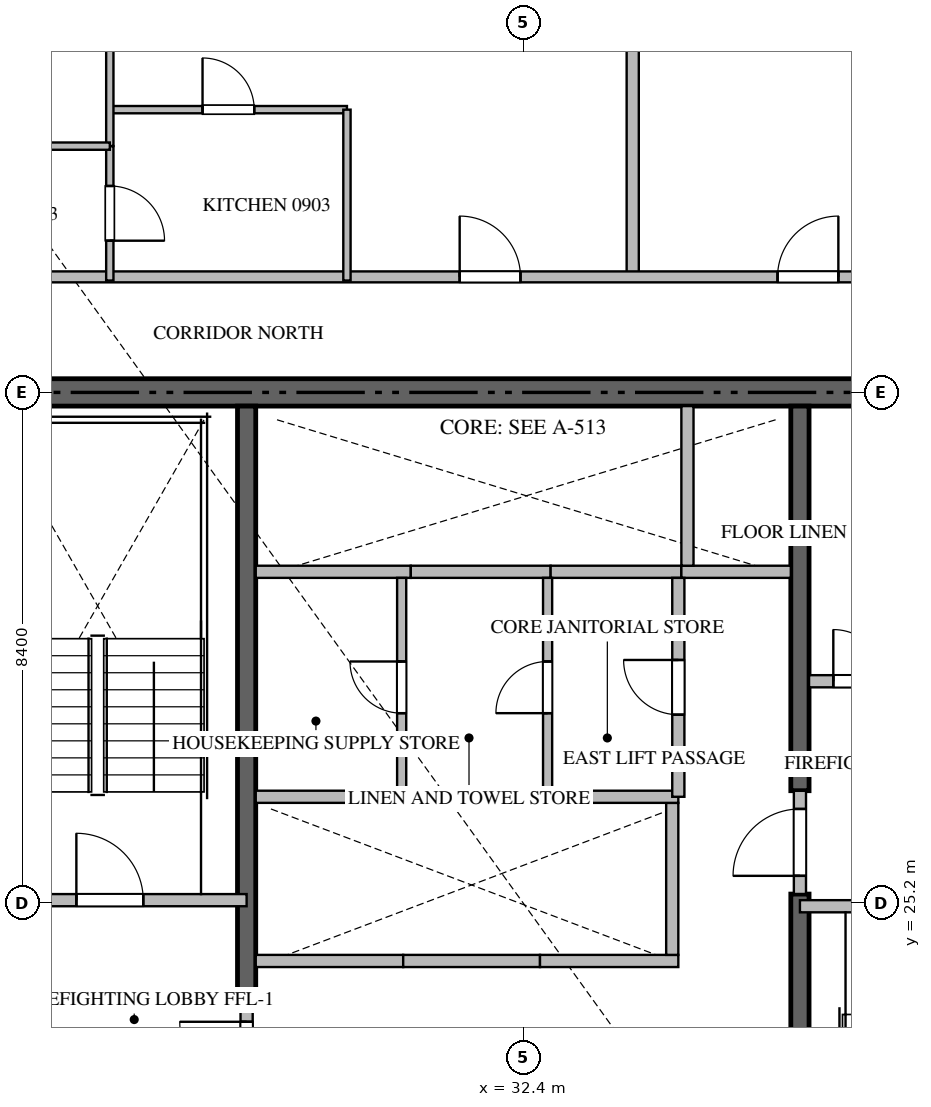
"""IFC4 building model, lengths in metres.
Left out: names, types, materials, properties, quantities, classifications, styles, units other than length and angle.
Written with IfcOpenShell. Run it as: python <this file> out.ifc"""

import sys

from ifc_helpers import new_model, si_unit, direction, frame, frame_2d, origin, place, context, subcontext, project, spatial, rectangle, extrude, source, transform, mapped, element, fill, save


model = new_model("IFC4")
c1 = context("Model", 3, precision=1e-05, world=origin(), true_north=direction((0.0, 1.0)))
c2 = subcontext(c1, "Body", "Model", "MODEL_VIEW")
j1 = project(units=[si_unit("LENGTHUNIT", "METRE"), si_unit("PLANEANGLEUNIT", "RADIAN")], contexts=[c1])
p1 = place(None, origin())
s1 = spatial("IfcSite", under=j1, at=p1, CompositionType="ELEMENT")
p2 = place(p1, origin())
s2 = spatial("IfcBuilding", under=s1, at=p2, CompositionType="ELEMENT")
p3 = place(p2, frame((0.0, 0.0, 41.7)))
s3 = spatial("IfcBuildingStorey", under=s2, at=p3, CompositionType="ELEMENT", Elevation=41.7)
p4 = place(p3, frame((41.4, 33.6, -0.26), z_axis=(0.0, 0.0, 1.0), x_axis=(-1.0, 0.0, 0.0)))
e1 = element("IfcWall", 1, at=p4, inside=s3, PredefinedType="SHEAR", context=c2, shape_type="SweptSolid", body=[
    extrude(rectangle(XDim=18.0, YDim=0.45, at=frame_2d((9.0, 0.0))), origin(), (0.0, 0.0, 1.0), 3.748),
])
p5 = place(p3, frame((27.85, 23.55, -0.26), z_axis=(0.0, 0.0, 1.0), x_axis=(0.0, 1.0, 0.0)))
e2 = element("IfcWall", 2, at=p5, inside=s3, PredefinedType="SHEAR", context=c2, shape_type="SweptSolid", body=[
    extrude(rectangle(XDim=9.825, YDim=0.3, at=frame_2d((4.913, 0.0))), origin(), (0.0, 0.0, 1.0), 3.748),
])
p6 = place(p3, frame((36.95, 17.025, -0.26), z_axis=(0.0, 0.0, 1.0), x_axis=(0.0, 1.0, 0.0)))
e3 = element("IfcWall", 3, at=p6, inside=s3, PredefinedType="SHEAR", context=c2, shape_type="SweptSolid", body=[
    extrude(rectangle(XDim=8.325, YDim=0.3, at=frame_2d((4.163, 0.0))), origin(), (0.0, 0.0, 1.0), 3.748),
])
p7 = place(p3, frame((36.95, 27.05, -0.26), z_axis=(0.0, 0.0, 1.0), x_axis=(0.0, 1.0, 0.0)))
e4 = element("IfcWall", 4, at=p7, inside=s3, PredefinedType="SHEAR", context=c2, shape_type="SweptSolid", body=[
    extrude(rectangle(XDim=6.325, YDim=0.3, at=frame_2d((3.163, 0.0))), origin(), (0.0, 0.0, 1.0), 3.748),
])
p8 = place(p3, frame((23.4, 25.25, 0.0), z_axis=(0.0, 0.0, 1.0), x_axis=(1.0, 0.0, 0.0)))
e5 = element("IfcWall", 5, at=p8, inside=s3, PredefinedType="STANDARD", context=c2, shape_type="SweptSolid", body=[
    extrude(rectangle(XDim=4.45, YDim=0.2, at=frame_2d((2.225, 0.0))), origin(), (0.0, 0.0, 1.0), 3.49),
])
p9 = place(p8, frame((1.65, 0.0, 0.0)))
e6 = element("IfcOpeningElement", 6, at=p9, cuts=e5, PredefinedType="OPENING", context=c2, shape_type="SweptSolid", body=[
    extrude(rectangle(XDim=1.1, YDim=2.15, at=frame_2d((0.55, 1.075))), frame((0.0, 0.11, 0.0), z_axis=(0.0, -1.0, 0.0), x_axis=(1.0, 0.0, 0.0)), (0.0, 0.0, 1.0), 0.22),
])
p10 = place(p3, frame((36.95, 25.15, 0.0), z_axis=(0.0, 0.0, 1.0), x_axis=(1.0, 0.0, 0.0)))
e7 = element("IfcWall", 7, at=p10, inside=s3, PredefinedType="STANDARD", context=c2, shape_type="SweptSolid", body=[
    extrude(rectangle(XDim=4.45, YDim=0.2, at=frame_2d((2.225, 0.0))), origin(), (0.0, 0.0, 1.0), 3.49),
])
p11 = place(p10, frame((1.65, 0.0, 0.0)))
e8 = element("IfcOpeningElement", 8, at=p11, cuts=e7, PredefinedType="OPENING", context=c2, shape_type="SweptSolid", body=[
    extrude(rectangle(XDim=1.1, YDim=2.15, at=frame_2d((0.55, 1.075))), frame((0.0, 0.11, 0.0), z_axis=(0.0, -1.0, 0.0), x_axis=(1.0, 0.0, 0.0)), (0.0, 0.0, 1.0), 0.22),
])
p12 = place(p3, frame((28.0, 24.25, 0.0), z_axis=(0.0, 0.0, 1.0), x_axis=(1.0, 0.0, 0.0)))
e9 = element("IfcWall", 9, at=p12, inside=s3, PredefinedType="STANDARD", context=c2, shape_type="SweptSolid", body=[
    extrude(rectangle(XDim=2.425, YDim=0.2, at=frame_2d((1.212, 0.0))), origin(), (0.0, 0.0, 1.0), 3.49),
])
p13 = place(p3, frame((30.425, 24.25, 0.0), z_axis=(0.0, 0.0, 1.0), x_axis=(1.0, 0.0, 0.0)))
e10 = element("IfcWall", 10, at=p13, inside=s3, PredefinedType="STANDARD", context=c2, shape_type="SweptSolid", body=[
    extrude(rectangle(XDim=2.25, YDim=0.2, at=frame_2d((1.125, 0.0))), origin(), (0.0, 0.0, 1.0), 3.49),
])
p14 = place(p3, frame((32.675, 24.25, 0.0), z_axis=(0.0, 0.0, 1.0), x_axis=(1.0, 0.0, 0.0)))
e11 = element("IfcWall", 11, at=p14, inside=s3, PredefinedType="STANDARD", context=c2, shape_type="SweptSolid", body=[
    extrude(rectangle(XDim=2.275, YDim=0.2, at=frame_2d((1.137, 0.0))), origin(), (0.0, 0.0, 1.0), 3.49),
])
p15 = place(p3, frame((34.85, 24.35, 0.0), z_axis=(0.0, 0.0, 1.0), x_axis=(0.0, 1.0, 0.0)))
e12 = element("IfcWall", 12, at=p15, inside=s3, PredefinedType="STANDARD", context=c2, shape_type="SweptSolid", body=[
    extrude(rectangle(XDim=2.5, YDim=0.2, at=frame_2d((1.25, 0.0))), origin(), (0.0, 0.0, 1.0), 3.49),
])
p16 = place(p3, frame((28.0, 30.65, 0.0), z_axis=(0.0, 0.0, 1.0), x_axis=(1.0, 0.0, 0.0)))
e13 = element("IfcWall", 13, at=p16, inside=s3, PredefinedType="STANDARD", context=c2, shape_type="SweptSolid", body=[
    extrude(rectangle(XDim=2.55, YDim=0.2, at=frame_2d((1.275, 0.0))), origin(), (0.0, 0.0, 1.0), 3.49),
])
p17 = place(p3, frame((30.55, 30.65, 0.0), z_axis=(0.0, 0.0, 1.0), x_axis=(1.0, 0.0, 0.0)))
e14 = element("IfcWall", 14, at=p17, inside=s3, PredefinedType="STANDARD", context=c2, shape_type="SweptSolid", body=[
    extrude(rectangle(XDim=2.3, YDim=0.2, at=frame_2d((1.15, 0.0))), origin(), (0.0, 0.0, 1.0), 3.49),
])
p18 = place(p3, frame((32.85, 30.65, 0.0), z_axis=(0.0, 0.0, 1.0), x_axis=(1.0, 0.0, 0.0)))
e15 = element("IfcWall", 15, at=p18, inside=s3, PredefinedType="STANDARD", context=c2, shape_type="SweptSolid", body=[
    extrude(rectangle(XDim=2.15, YDim=0.2, at=frame_2d((1.075, 0.0))), origin(), (0.0, 0.0, 1.0), 3.49),
])
p19 = place(p3, frame((35.0, 30.65, 0.0), z_axis=(0.0, 0.0, 1.0), x_axis=(1.0, 0.0, 0.0)))
e16 = element("IfcWall", 16, at=p19, inside=s3, PredefinedType="STANDARD", context=c2, shape_type="SweptSolid", body=[
    extrude(rectangle(XDim=1.8, YDim=0.2, at=frame_2d((0.9, 0.0))), origin(), (0.0, 0.0, 1.0), 3.49),
])
p20 = place(p3, frame((35.1, 30.75, 0.0), z_axis=(0.0, 0.0, 1.0), x_axis=(0.0, 1.0, 0.0)))
e17 = element("IfcWall", 17, at=p20, inside=s3, PredefinedType="STANDARD", context=c2, shape_type="SweptSolid", body=[
    extrude(rectangle(XDim=2.625, YDim=0.2, at=frame_2d((1.312, 0.0))), origin(), (0.0, 0.0, 1.0), 3.49),
])
p21 = place(p3, frame((37.1, 28.85, 0.0), z_axis=(0.0, 0.0, 1.0), x_axis=(1.0, 0.0, 0.0)))
e18 = element("IfcWall", 18, at=p21, inside=s3, PredefinedType="STANDARD", context=c2, shape_type="SweptSolid", body=[
    extrude(rectangle(XDim=1.648, YDim=0.2, at=frame_2d((0.824, 0.0))), origin(), (0.0, 0.0, 1.0), 3.49),
])
p22 = place(p21, frame((0.399, 0.0, 0.0)))
e19 = element("IfcOpeningElement", 19, at=p22, cuts=e18, PredefinedType="OPENING", context=c2, shape_type="SweptSolid", body=[
    extrude(rectangle(XDim=0.85, YDim=2.1, at=frame_2d((0.425, 1.05))), frame((0.0, 0.11, 0.0), z_axis=(0.0, -1.0, 0.0), x_axis=(1.0, 0.0, 0.0)), (0.0, 0.0, 1.0), 0.22),
])
p23 = place(p3, frame((27.85, 21.852, 0.0), z_axis=(0.0, 0.0, 1.0), x_axis=(0.0, 1.0, 0.0)))
e20 = element("IfcWall", 20, at=p23, inside=s3, PredefinedType="STANDARD", context=c2, shape_type="SweptSolid", body=[
    extrude(rectangle(XDim=1.696, YDim=0.2, at=frame_2d((0.848, 0.0))), origin(), (0.0, 0.0, 1.0), 3.49),
])
p24 = place(p23, frame((0.298, 0.0, 0.0)))
e21 = element("IfcOpeningElement", 21, at=p24, cuts=e20, PredefinedType="OPENING", context=c2, shape_type="SweptSolid", body=[
    extrude(rectangle(XDim=1.1, YDim=2.15, at=frame_2d((0.55, 1.075))), frame((0.0, 0.11, 0.0), z_axis=(0.0, -1.0, 0.0), x_axis=(1.0, 0.0, 0.0)), (0.0, 0.0, 1.0), 0.22),
])
p25 = place(p3, frame((36.95, 25.352, 0.0), z_axis=(0.0, 0.0, 1.0), x_axis=(0.0, 1.0, 0.0)))
e22 = element("IfcWall", 22, at=p25, inside=s3, PredefinedType="STANDARD", context=c2, shape_type="SweptSolid", body=[
    extrude(rectangle(XDim=1.696, YDim=0.2, at=frame_2d((0.848, 0.0))), origin(), (0.0, 0.0, 1.0), 3.49),
])
p26 = place(p25, frame((0.298, 0.0, 0.0)))
e23 = element("IfcOpeningElement", 23, at=p26, cuts=e22, PredefinedType="OPENING", context=c2, shape_type="SweptSolid", body=[
    extrude(rectangle(XDim=1.1, YDim=2.15, at=frame_2d((0.55, 1.075))), frame((0.0, 0.11, 0.0), z_axis=(0.0, -1.0, 0.0), x_axis=(1.0, 0.0, 0.0)), (0.0, 0.0, 1.0), 0.22),
])
p27 = place(p3, frame((28.0, 26.95, 0.0), z_axis=(0.0, 0.0, 1.0), x_axis=(1.0, 0.0, 0.0)))
e24 = element("IfcWall", 24, at=p27, inside=s3, PredefinedType="STANDARD", context=c2, shape_type="SweptSolid", body=[
    extrude(rectangle(XDim=6.95, YDim=0.2, at=frame_2d((3.475, 0.0))), origin(), (0.0, 0.0, 1.0), 3.49),
])
p28 = place(p3, frame((34.95, 26.95, 0.0), z_axis=(0.0, 0.0, 1.0), x_axis=(0.0, 1.0, 0.0)))
e25 = element("IfcWall", 25, at=p28, inside=s3, PredefinedType="STANDARD", context=c2, shape_type="SweptSolid", body=[
    extrude(rectangle(XDim=3.6, YDim=0.2, at=frame_2d((1.8, 0.0))), origin(), (0.0, 0.0, 1.0), 3.49),
])
p29 = place(p28, frame((1.35, 0.0, 0.0)))
e26 = element("IfcOpeningElement", 26, at=p29, cuts=e25, PredefinedType="OPENING", context=c2, shape_type="SweptSolid", body=[
    extrude(rectangle(XDim=0.9, YDim=2.1, at=frame_2d((0.45, 1.05))), frame((0.0, 0.11, 0.0), z_axis=(0.0, -1.0, 0.0), x_axis=(1.0, 0.0, 0.0)), (0.0, 0.0, 1.0), 0.22),
])
p30 = place(p3, frame((32.8, 26.95, 0.0), z_axis=(0.0, 0.0, 1.0), x_axis=(0.0, 1.0, 0.0)))
e27 = element("IfcWall", 27, at=p30, inside=s3, PredefinedType="PARTITIONING", context=c2, shape_type="SweptSolid", body=[
    extrude(rectangle(XDim=3.6, YDim=0.15, at=frame_2d((1.8, 0.0))), origin(), (0.0, 0.0, 1.0), 3.49),
])
p31 = place(p30, frame((1.375, 0.0, 0.0)))
e28 = element("IfcOpeningElement", 28, at=p31, cuts=e27, PredefinedType="OPENING", context=c2, shape_type="SweptSolid", body=[
    extrude(rectangle(XDim=0.85, YDim=2.1, at=frame_2d((0.425, 1.05))), frame((0.0, 0.085, 0.0), z_axis=(0.0, -1.0, 0.0), x_axis=(1.0, 0.0, 0.0)), (0.0, 0.0, 1.0), 0.17),
])
p32 = place(p3, frame((30.4, 26.95, 0.0), z_axis=(0.0, 0.0, 1.0), x_axis=(0.0, 1.0, 0.0)))
e29 = element("IfcWall", 29, at=p32, inside=s3, PredefinedType="PARTITIONING", context=c2, shape_type="SweptSolid", body=[
    extrude(rectangle(XDim=3.6, YDim=0.15, at=frame_2d((1.8, 0.0))), origin(), (0.0, 0.0, 1.0), 3.49),
])
p33 = place(p32, frame((1.375, 0.0, 0.0)))
e30 = element("IfcOpeningElement", 30, at=p33, cuts=e29, PredefinedType="OPENING", context=c2, shape_type="SweptSolid", body=[
    extrude(rectangle(XDim=0.85, YDim=2.1, at=frame_2d((0.425, 1.05))), frame((0.0, 0.085, 0.0), z_axis=(0.0, -1.0, 0.0), x_axis=(1.0, 0.0, 0.0)), (0.0, 0.0, 1.0), 0.17),
])
p34 = place(p3, frame((34.2, 35.5, 0.0), z_axis=(0.0, 0.0, 1.0), x_axis=(0.0, 1.0, 0.0)))
e31 = element("IfcWall", 31, at=p34, inside=s3, PredefinedType="PARTITIONING", context=c2, shape_type="SweptSolid", body=[
    extrude(rectangle(XDim=14.618, YDim=0.2, at=frame_2d((7.309, 0.0))), origin(), (0.0, 0.0, 1.0), 3.49),
])
p35 = place(p3, frame((21.402, 35.5, 0.0), z_axis=(0.0, 0.0, 1.0), x_axis=(1.0, 0.0, 0.0)))
e32 = element("IfcWall", 32, at=p35, inside=s3, PredefinedType="PARTITIONING", context=c2, shape_type="SweptSolid", body=[
    extrude(rectangle(XDim=21.996, YDim=0.18, at=frame_2d((10.998, 0.0))), origin(), (0.0, 0.0, 1.0), 3.49),
])
p36 = place(p35, frame((9.952, 0.0, 0.0)))
e33 = element("IfcOpeningElement", 33, at=p36, cuts=e32, PredefinedType="OPENING", context=c2, shape_type="SweptSolid", body=[
    extrude(rectangle(XDim=1.0, YDim=2.15, at=frame_2d((0.5, 1.075))), frame((0.0, 0.1, 0.0), z_axis=(0.0, -1.0, 0.0), x_axis=(1.0, 0.0, 0.0)), (0.0, 0.0, 1.0), 0.2),
])
p37 = place(p35, frame((15.18, 0.0, 0.0)))
e34 = element("IfcOpeningElement", 34, at=p37, cuts=e32, PredefinedType="OPENING", context=c2, shape_type="SweptSolid", body=[
    extrude(rectangle(XDim=1.0, YDim=2.15, at=frame_2d((0.5, 1.075))), frame((0.0, 0.1, 0.0), z_axis=(0.0, -1.0, 0.0), x_axis=(1.0, 0.0, 0.0)), (0.0, 0.0, 1.0), 0.2),
])
p38 = place(p3, frame((25.6, 38.25, 0.0), z_axis=(0.0, 0.0, 1.0), x_axis=(1.0, 0.0, 0.0)))
e35 = element("IfcWall", 35, at=p38, inside=s3, PredefinedType="PARTITIONING", context=c2, shape_type="SweptSolid", body=[
    extrude(rectangle(XDim=3.9, YDim=0.12, at=frame_2d((1.95, 0.0))), origin(), (0.0, 0.0, 1.0), 3.49),
])
p39 = place(p38, frame((1.525, 0.0, 0.0)))
e36 = element("IfcOpeningElement", 36, at=p39, cuts=e35, PredefinedType="OPENING", context=c2, shape_type="SweptSolid", body=[
    extrude(rectangle(XDim=0.85, YDim=2.1, at=frame_2d((0.425, 1.05))), frame((0.0, 0.07, 0.0), z_axis=(0.0, -1.0, 0.0), x_axis=(1.0, 0.0, 0.0)), (0.0, 0.0, 1.0), 0.14),
])
p40 = place(p3, frame((29.5, 38.25, 0.0), z_axis=(0.0, 0.0, 1.0), x_axis=(0.0, -1.0, 0.0)))
e37 = element("IfcWall", 37, at=p40, inside=s3, PredefinedType="PARTITIONING", context=c2, shape_type="SweptSolid", body=[
    extrude(rectangle(XDim=2.81, YDim=0.12, at=frame_2d((1.405, 0.0))), origin(), (0.0, 0.0, 1.0), 3.49),
])
p41 = place(p3, frame((25.6, 37.65, 0.0), z_axis=(0.0, 0.0, 1.0), x_axis=(0.0, -1.0, 0.0)))
e38 = element("IfcWall", 38, at=p41, inside=s3, PredefinedType="PARTITIONING", context=c2, shape_type="SweptSolid", body=[
    extrude(rectangle(XDim=2.21, YDim=0.12, at=frame_2d((1.105, 0.0))), origin(), (0.0, 0.0, 1.0), 3.49),
])
p42 = place(p41, frame((0.655, 0.0, 0.0)))
e39 = element("IfcOpeningElement", 39, at=p42, cuts=e38, PredefinedType="OPENING", context=c2, shape_type="SweptSolid", body=[
    extrude(rectangle(XDim=0.9, YDim=2.1, at=frame_2d((0.45, 1.05))), frame((0.0, 0.07, 0.0), z_axis=(0.0, -1.0, 0.0), x_axis=(1.0, 0.0, 0.0)), (0.0, 0.0, 1.0), 0.14),
])
p43 = place(p3, frame((25.6, 43.834, 0.0), z_axis=(0.0, 0.0, 1.0), x_axis=(0.0, -1.0, 0.0)))
e40 = element("IfcWall", 40, at=p43, inside=s3, PredefinedType="PARTITIONING", context=c2, shape_type="SweptSolid", body=[
    extrude(rectangle(XDim=6.182, YDim=0.12, at=frame_2d((3.091, 0.0))), origin(), (0.0, 0.0, 1.0), 3.49),
])
p44 = place(p3, frame((22.552, 37.65, 0.0), z_axis=(0.0, 0.0, 1.0), x_axis=(1.0, 0.0, 0.0)))
e41 = element("IfcWall", 41, at=p44, inside=s3, PredefinedType="PARTITIONING", context=c2, shape_type="SweptSolid", body=[
    extrude(rectangle(XDim=3.048, YDim=0.12, at=frame_2d((1.524, 0.0))), origin(), (0.0, 0.0, 1.0), 3.49),
])
p45 = place(p44, frame((1.099, 0.0, 0.0)))
e42 = element("IfcOpeningElement", 42, at=p45, cuts=e41, PredefinedType="OPENING", context=c2, shape_type="SweptSolid", body=[
    extrude(rectangle(XDim=0.85, YDim=2.1, at=frame_2d((0.425, 1.05))), frame((0.0, 0.07, 0.0), z_axis=(0.0, -1.0, 0.0), x_axis=(1.0, 0.0, 0.0)), (0.0, 0.0, 1.0), 0.14),
])
m1 = source(origin(), c2, "Body", "SweptSolid", [
    extrude(rectangle(XDim=1.1, YDim=2.15, at=frame_2d((0.55, 1.075))), frame((0.0, 0.025, 0.0), z_axis=(0.0, -1.0, 0.0), x_axis=(1.0, 0.0, 0.0)), (0.0, 0.0, 1.0), 0.05),
])
p46 = place(p9, origin())
e43 = element("IfcDoor", 43, at=p46, inside=s3, OperationType="SINGLE_SWING_LEFT", PredefinedType="DOOR", context=c2, shape_type="MappedRepresentation", body=[
    mapped(m1, transform((0.0, 0.0, 0.0), scale=1.0)),
])
fill(e6, e43)
m2 = source(origin(), c2, "Body", "SweptSolid", [
    extrude(rectangle(XDim=0.85, YDim=2.1, at=frame_2d((0.425, 1.05))), frame((0.0, 0.025, 0.0), z_axis=(0.0, -1.0, 0.0), x_axis=(1.0, 0.0, 0.0)), (0.0, 0.0, 1.0), 0.05),
])
p47 = place(p22, origin())
e44 = element("IfcDoor", 44, at=p47, inside=s3, OperationType="SINGLE_SWING_LEFT", PredefinedType="DOOR", context=c2, shape_type="MappedRepresentation", body=[
    mapped(m2, transform((0.0, 0.0, 0.0), scale=1.0)),
])
fill(e19, e44)
p48 = place(p24, origin())
e45 = element("IfcDoor", 45, at=p48, inside=s3, OperationType="SINGLE_SWING_RIGHT", PredefinedType="DOOR", context=c2, shape_type="MappedRepresentation", body=[
    mapped(m1, transform((0.0, 0.0, 0.0), scale=1.0)),
])
fill(e21, e45)
p49 = place(p26, origin())
e46 = element("IfcDoor", 46, at=p49, inside=s3, OperationType="SINGLE_SWING_LEFT", PredefinedType="DOOR", context=c2, shape_type="MappedRepresentation", body=[
    mapped(m1, transform((0.0, 0.0, 0.0), scale=1.0)),
])
fill(e23, e46)
m3 = source(origin(), c2, "Body", "SweptSolid", [
    extrude(rectangle(XDim=0.9, YDim=2.1, at=frame_2d((0.45, 1.05))), frame((0.0, 0.025, 0.0), z_axis=(0.0, -1.0, 0.0), x_axis=(1.0, 0.0, 0.0)), (0.0, 0.0, 1.0), 0.05),
])
p50 = place(p29, origin())
e47 = element("IfcDoor", 47, at=p50, inside=s3, OperationType="SINGLE_SWING_RIGHT", PredefinedType="DOOR", context=c2, shape_type="MappedRepresentation", body=[
    mapped(m3, transform((0.0, 0.0, 0.0), scale=1.0)),
])
fill(e26, e47)
p51 = place(p31, origin())
e48 = element("IfcDoor", 48, at=p51, inside=s3, OperationType="SINGLE_SWING_LEFT", PredefinedType="DOOR", context=c2, shape_type="MappedRepresentation", body=[
    mapped(m2, transform((0.0, 0.0, 0.0), scale=1.0)),
])
fill(e28, e48)
p52 = place(p33, origin())
e49 = element("IfcDoor", 49, at=p52, inside=s3, OperationType="SINGLE_SWING_RIGHT", PredefinedType="DOOR", context=c2, shape_type="MappedRepresentation", body=[
    mapped(m2, transform((0.0, 0.0, 0.0), scale=1.0)),
])
fill(e30, e49)
m4 = source(origin(), c2, "Body", "SweptSolid", [
    extrude(rectangle(XDim=1.0, YDim=2.15, at=frame_2d((0.5, 1.075))), frame((0.0, 0.025, 0.0), z_axis=(0.0, -1.0, 0.0), x_axis=(1.0, 0.0, 0.0)), (0.0, 0.0, 1.0), 0.05),
])
p53 = place(p36, origin())
e50 = element("IfcDoor", 50, at=p53, inside=s3, OperationType="SINGLE_SWING_LEFT", PredefinedType="DOOR", context=c2, shape_type="MappedRepresentation", body=[
    mapped(m4, transform((0.0, 0.0, 0.0), scale=1.0)),
])
fill(e33, e50)
p54 = place(p37, origin())
e51 = element("IfcDoor", 51, at=p54, inside=s3, OperationType="SINGLE_SWING_RIGHT", PredefinedType="DOOR", context=c2, shape_type="MappedRepresentation", body=[
    mapped(m4, transform((0.0, 0.0, 0.0), scale=1.0)),
])
fill(e34, e51)
p55 = place(p39, origin())
e52 = element("IfcDoor", 52, at=p55, inside=s3, OperationType="SINGLE_SWING_LEFT", PredefinedType="DOOR", context=c2, shape_type="MappedRepresentation", body=[
    mapped(m2, transform((0.0, 0.0, 0.0), scale=1.0)),
])
fill(e36, e52)
p56 = place(p42, origin())
e53 = element("IfcDoor", 53, at=p56, inside=s3, OperationType="SINGLE_SWING_RIGHT", PredefinedType="DOOR", context=c2, shape_type="MappedRepresentation", body=[
    mapped(m3, transform((0.0, 0.0, 0.0), scale=1.0)),
])
fill(e39, e53)
save(model, sys.argv[1])
